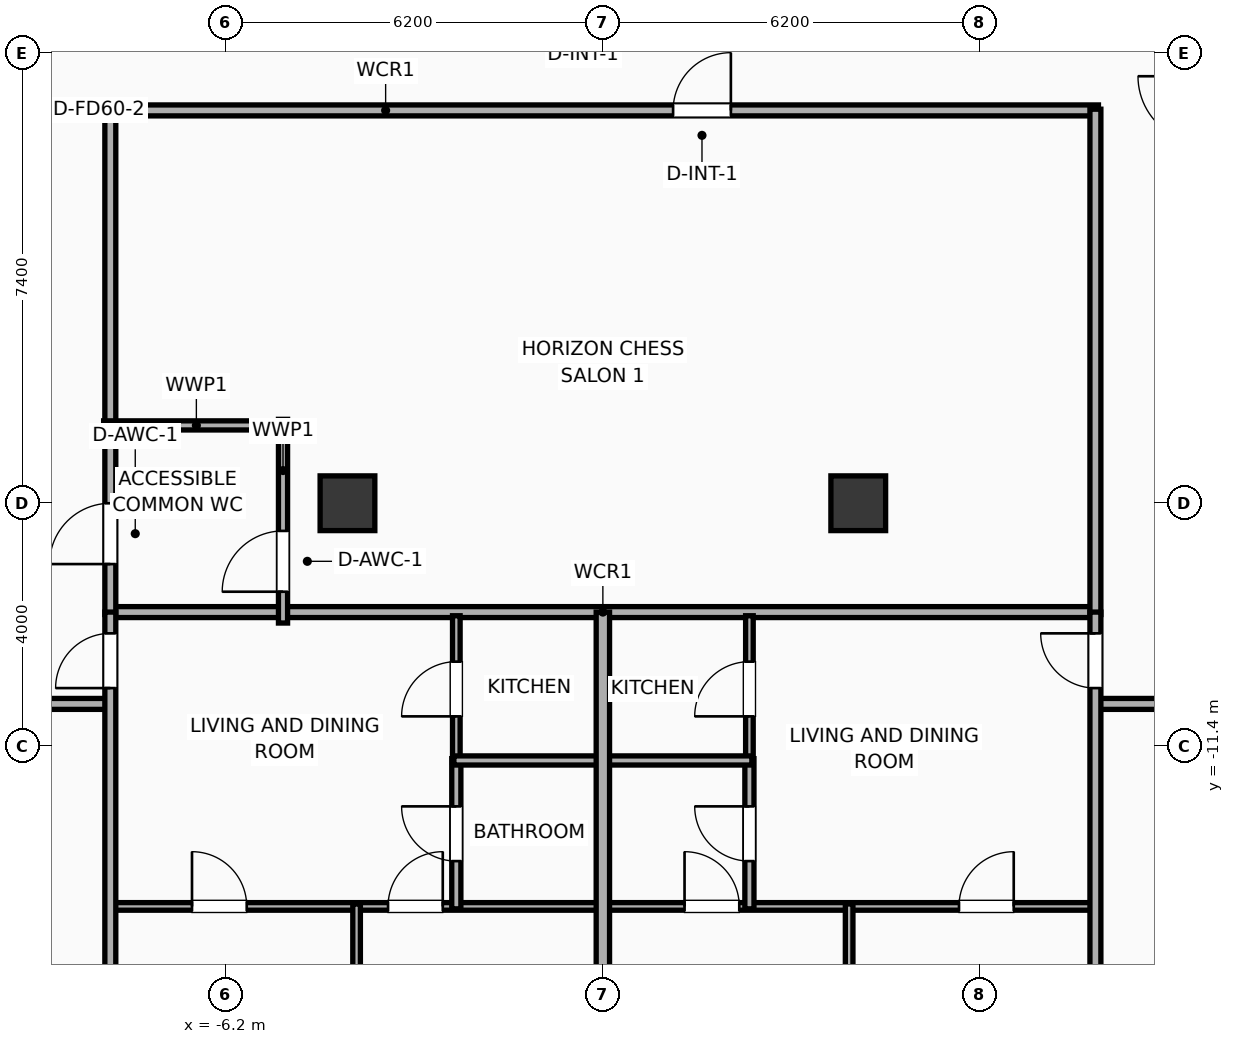
"""IFC4 building model, lengths in metres.
Left out: names, types, materials, properties, quantities, classifications, styles, units other than length and angle.
Written with IfcOpenShell. Run it as: python <this file> out.ifc"""

import sys

from ifc_helpers import new_model, si_unit, direction, frame, frame_2d, origin, origin_2d, place, context, subcontext, project, spatial, rectangle, extrude, element, fill, save


model = new_model("IFC4")
c1 = context("Model", 3, precision=1e-05, world=origin(), true_north=direction((0.0, 1.0)))
c2 = subcontext(c1, "Body", "Model", "MODEL_VIEW")
j1 = project(units=[si_unit("LENGTHUNIT", "METRE"), si_unit("PLANEANGLEUNIT", "RADIAN")], contexts=[c1])
p1 = place(None, origin())
s1 = spatial("IfcSite", under=j1, at=p1, CompositionType="ELEMENT")
p2 = place(p1, origin())
s2 = spatial("IfcBuilding", under=s1, at=p2, CompositionType="ELEMENT")
p3 = place(p2, frame((0.0, 0.0, 148.2)))
s3 = spatial("IfcBuildingStorey", under=s2, at=p3, CompositionType="ELEMENT", Elevation=148.2)
for number, where, z_axis, x_axis in (
    (1, (-4.2, -7.4, 0.0), (0.0, 0.0, 1.0), (1.0, 0.0, 0.0)),
    (2, (4.2, -7.4, 0.0), (0.0, 0.0, 1.0), (1.0, 0.0, 0.0)),
):
    element("IfcColumn", number, at=place(p3, frame(where, z_axis=z_axis, x_axis=x_axis)), inside=s3, PredefinedType="COLUMN", context=c2, shape_type="SweptSolid", body=[
        extrude(rectangle(XDim=0.9, YDim=0.9, at=origin_2d()), origin(), (0.0, 0.0, 1.0), 3.9),
    ])
p4 = place(p3, frame((-8.15, -9.19, 0.0), z_axis=(0.0, 0.0, 1.0), x_axis=(1.0, 0.0, 0.0)))
e3 = element("IfcWall", 3, at=p4, inside=s3, PredefinedType="PARTITIONING", context=c2, shape_type="SweptSolid", body=[
    extrude(rectangle(XDim=16.3, YDim=0.18, at=frame_2d((8.15, 0.0))), origin(), (0.0, 0.0, 1.0), 3.65),
])
p5 = place(p3, frame((-8.15, -0.94, 0.0), z_axis=(0.0, 0.0, 1.0), x_axis=(1.0, 0.0, 0.0)))
e4 = element("IfcWall", 4, at=p5, inside=s3, PredefinedType="PARTITIONING", context=c2, shape_type="SweptSolid", body=[
    extrude(rectangle(XDim=16.3, YDim=0.18, at=frame_2d((8.15, 0.0))), origin(), (0.0, 0.0, 1.0), 3.65),
])
p6 = place(p5, frame((9.305, 0.0, 0.0)))
e5 = element("IfcOpeningElement", 5, at=p6, cuts=e4, PredefinedType="OPENING", context=c2, shape_type="SweptSolid", body=[
    extrude(rectangle(XDim=0.95, YDim=2.05, at=frame_2d((0.475, 1.025))), frame((0.0, 0.1, 0.0), z_axis=(0.0, -1.0, 0.0), x_axis=(1.0, 0.0, 0.0)), (0.0, 0.0, 1.0), 0.2),
])
p7 = place(p3, frame((-8.1, -9.23, 0.0), z_axis=(0.0, 0.0, 1.0), x_axis=(0.0, 1.0, 0.0)))
e6 = element("IfcWall", 6, at=p7, inside=s3, PredefinedType="PARTITIONING", context=c2, shape_type="SweptSolid", body=[
    extrude(rectangle(XDim=8.31, YDim=0.18, at=frame_2d((4.155, 0.0))), origin(), (0.0, 0.0, 1.0), 3.65),
])
p8 = place(p7, frame((0.83, 0.0, 0.0)))
e7 = element("IfcOpeningElement", 7, at=p8, cuts=e6, PredefinedType="OPENING", context=c2, shape_type="SweptSolid", body=[
    extrude(rectangle(XDim=1.0, YDim=2.05, at=frame_2d((0.5, 1.025))), frame((0.0, 0.1, 0.0), z_axis=(0.0, -1.0, 0.0), x_axis=(1.0, 0.0, 0.0)), (0.0, 0.0, 1.0), 0.2),
])
p9 = place(p3, frame((8.1, -9.23, 0.0), z_axis=(0.0, 0.0, 1.0), x_axis=(0.0, 1.0, 0.0)))
e8 = element("IfcWall", 8, at=p9, inside=s3, PredefinedType="PARTITIONING", context=c2, shape_type="SweptSolid", body=[
    extrude(rectangle(XDim=8.31, YDim=0.18, at=frame_2d((4.155, 0.0))), origin(), (0.0, 0.0, 1.0), 3.65),
])
p10 = place(p3, frame((-5.26, -9.37, 0.0), z_axis=(0.0, 0.0, 1.0), x_axis=(0.0, 1.0, 0.0)))
e9 = element("IfcWall", 9, at=p10, inside=s3, PredefinedType="PLUMBINGWALL", context=c2, shape_type="SweptSolid", body=[
    extrude(rectangle(XDim=3.35, YDim=0.15, at=frame_2d((1.675, 0.0))), origin(), (0.0, 0.0, 1.0), 3.65),
])
p11 = place(p10, frame((0.515, 0.0, 0.0)))
e10 = element("IfcOpeningElement", 10, at=p11, cuts=e9, PredefinedType="OPENING", context=c2, shape_type="SweptSolid", body=[
    extrude(rectangle(XDim=1.0, YDim=2.05, at=frame_2d((0.5, 1.025))), frame((0.0, 0.085, 0.0), z_axis=(0.0, -1.0, 0.0), x_axis=(1.0, 0.0, 0.0)), (0.0, 0.0, 1.0), 0.17),
])
p12 = place(p3, frame((-8.21, -6.12, 0.0), z_axis=(0.0, 0.0, 1.0), x_axis=(1.0, 0.0, 0.0)))
e11 = element("IfcWall", 11, at=p12, inside=s3, PredefinedType="PLUMBINGWALL", context=c2, shape_type="SweptSolid", body=[
    extrude(rectangle(XDim=3.05, YDim=0.15, at=frame_2d((1.525, 0.0))), origin(), (0.0, 0.0, 1.0), 3.65),
])
p13 = place(p3, frame((-19.5, -10.7, 0.0), z_axis=(0.0, 0.0, 1.0), x_axis=(1.0, 0.0, 0.0)))
e12 = element("IfcWall", 12, at=p13, inside=s3, PredefinedType="PARTITIONING", context=c2, shape_type="SweptSolid", body=[
    extrude(rectangle(XDim=11.42, YDim=0.18, at=frame_2d((5.71, 0.0))), origin(), (0.0, 0.0, 1.0), 3.65),
])
p14 = place(p13, frame((2.623, 0.0, 0.0)))
e13 = element("IfcOpeningElement", 13, at=p14, cuts=e12, PredefinedType="OPENING", context=c2, shape_type="SweptSolid", body=[
    extrude(rectangle(XDim=0.9, YDim=2.05, at=frame_2d((0.45, 1.025))), frame((0.0, 0.1, 0.0), z_axis=(0.0, -1.0, 0.0), x_axis=(1.0, 0.0, 0.0)), (0.0, 0.0, 1.0), 0.2),
])
p15 = place(p13, frame((9.189, 0.0, 0.0)))
e14 = element("IfcOpeningElement", 14, at=p15, cuts=e12, PredefinedType="OPENING", context=c2, shape_type="SweptSolid", body=[
    extrude(rectangle(XDim=1.15, YDim=2.05, at=frame_2d((0.575, 1.025))), frame((0.0, 0.1, 0.0), z_axis=(0.0, -1.0, 0.0), x_axis=(1.0, 0.0, 0.0)), (0.0, 0.0, 1.0), 0.2),
])
p16 = place(p3, frame((8.08, -10.7, 0.0), z_axis=(0.0, 0.0, 1.0), x_axis=(1.0, 0.0, 0.0)))
e15 = element("IfcWall", 15, at=p16, inside=s3, PredefinedType="PARTITIONING", context=c2, shape_type="SweptSolid", body=[
    extrude(rectangle(XDim=11.42, YDim=0.18, at=frame_2d((5.71, 0.0))), origin(), (0.0, 0.0, 1.0), 3.65),
])
p17 = place(p16, frame((1.175, 0.0, 0.0)))
e16 = element("IfcOpeningElement", 16, at=p17, cuts=e15, PredefinedType="OPENING", context=c2, shape_type="SweptSolid", body=[
    extrude(rectangle(XDim=1.15, YDim=2.05, at=frame_2d((0.575, 1.025))), frame((0.0, 0.1, 0.0), z_axis=(0.0, -1.0, 0.0), x_axis=(1.0, 0.0, 0.0)), (0.0, 0.0, 1.0), 0.2),
])
p18 = place(p16, frame((6.87, 0.0, 0.0)))
e17 = element("IfcOpeningElement", 17, at=p18, cuts=e15, PredefinedType="OPENING", context=c2, shape_type="SweptSolid", body=[
    extrude(rectangle(XDim=1.15, YDim=2.05, at=frame_2d((0.575, 1.025))), frame((0.0, 0.1, 0.0), z_axis=(0.0, -1.0, 0.0), x_axis=(1.0, 0.0, 0.0)), (0.0, 0.0, 1.0), 0.2),
])
p19 = place(p3, frame((-8.08, -14.03, 0.0), z_axis=(0.0, 0.0, 1.0), x_axis=(1.0, 0.0, 0.0)))
e18 = element("IfcWall", 18, at=p19, inside=s3, PredefinedType="PARTITIONING", context=c2, shape_type="SweptSolid", body=[
    extrude(rectangle(XDim=8.06, YDim=0.125, at=frame_2d((4.03, 0.0))), origin(), (0.0, 0.0, 1.0), 3.65),
])
p20 = place(p19, frame((1.323, 0.0, 0.0)))
e19 = element("IfcOpeningElement", 19, at=p20, cuts=e18, PredefinedType="OPENING", context=c2, shape_type="SweptSolid", body=[
    extrude(rectangle(XDim=0.9, YDim=2.05, at=frame_2d((0.45, 1.025))), frame((0.0, 0.073, 0.0), z_axis=(0.0, -1.0, 0.0), x_axis=(1.0, 0.0, 0.0)), (0.0, 0.0, 1.0), 0.145),
])
p21 = place(p19, frame((4.547, 0.0, 0.0)))
e20 = element("IfcOpeningElement", 20, at=p21, cuts=e18, PredefinedType="OPENING", context=c2, shape_type="SweptSolid", body=[
    extrude(rectangle(XDim=0.9, YDim=2.05, at=frame_2d((0.45, 1.025))), frame((0.0, 0.073, 0.0), z_axis=(0.0, -1.0, 0.0), x_axis=(1.0, 0.0, 0.0)), (0.0, 0.0, 1.0), 0.145),
])
p22 = place(p3, frame((-2.41, -11.66, 0.0), z_axis=(0.0, 0.0, 1.0), x_axis=(0.0, 1.0, 0.0)))
e21 = element("IfcWall", 21, at=p22, inside=s3, PredefinedType="PARTITIONING", context=c2, shape_type="SweptSolid", body=[
    extrude(rectangle(XDim=2.41, YDim=0.125, at=frame_2d((1.205, 0.0))), origin(), (0.0, 0.0, 1.0), 3.65),
])
p23 = place(p22, frame((0.755, 0.0, 0.0)))
e22 = element("IfcOpeningElement", 22, at=p23, cuts=e21, PredefinedType="OPENING", context=c2, shape_type="SweptSolid", body=[
    extrude(rectangle(XDim=0.9, YDim=2.05, at=frame_2d((0.45, 1.025))), frame((0.0, 0.073, 0.0), z_axis=(0.0, -1.0, 0.0), x_axis=(1.0, 0.0, 0.0)), (0.0, 0.0, 1.0), 0.145),
])
p24 = place(p3, frame((-2.41, -14.07, 0.0), z_axis=(0.0, 0.0, 1.0), x_axis=(0.0, 1.0, 0.0)))
e23 = element("IfcWall", 23, at=p24, inside=s3, PredefinedType="PLUMBINGWALL", context=c2, shape_type="SweptSolid", body=[
    extrude(rectangle(XDim=2.47, YDim=0.15, at=frame_2d((1.235, 0.0))), origin(), (0.0, 0.0, 1.0), 3.65),
])
p25 = place(p24, frame((0.785, 0.0, 0.0)))
e24 = element("IfcOpeningElement", 24, at=p25, cuts=e23, PredefinedType="OPENING", context=c2, shape_type="SweptSolid", body=[
    extrude(rectangle(XDim=0.9, YDim=2.05, at=frame_2d((0.45, 1.025))), frame((0.0, 0.085, 0.0), z_axis=(0.0, -1.0, 0.0), x_axis=(1.0, 0.0, 0.0)), (0.0, 0.0, 1.0), 0.17),
])
p26 = place(p3, frame((-2.45, -11.63, 0.0), z_axis=(0.0, 0.0, 1.0), x_axis=(1.0, 0.0, 0.0)))
e25 = element("IfcWall", 25, at=p26, inside=s3, PredefinedType="PLUMBINGWALL", context=c2, shape_type="SweptSolid", body=[
    extrude(rectangle(XDim=2.43, YDim=0.15, at=frame_2d((1.215, 0.0))), origin(), (0.0, 0.0, 1.0), 3.65),
])
p27 = place(p3, frame((-4.05, -21.031, 0.0), z_axis=(0.0, 0.0, 1.0), x_axis=(0.0, 1.0, 0.0)))
e26 = element("IfcWall", 26, at=p27, inside=s3, PredefinedType="PARTITIONING", context=c2, shape_type="SweptSolid", body=[
    extrude(rectangle(XDim=7.041, YDim=0.125, at=frame_2d((3.521, 0.0))), origin(), (0.0, 0.0, 1.0), 3.65),
])
p28 = place(p3, frame((-8.1, -21.456, 0.0), z_axis=(0.0, 0.0, 1.0), x_axis=(0.0, 1.0, 0.0)))
e27 = element("IfcWall", 27, at=p28, inside=s3, PredefinedType="PARTITIONING", context=c2, shape_type="SweptSolid", body=[
    extrude(rectangle(XDim=12.266, YDim=0.18, at=frame_2d((6.133, 0.0))), origin(), (0.0, 0.0, 1.0), 3.65),
])
p29 = place(p28, frame((11.017, 0.0, 0.0)))
e28 = element("IfcOpeningElement", 28, at=p29, cuts=e27, PredefinedType="OPENING", context=c2, shape_type="SweptSolid", body=[
    extrude(rectangle(XDim=0.9, YDim=2.05, at=frame_2d((0.45, 1.025))), frame((0.0, 0.1, 0.0), z_axis=(0.0, -1.0, 0.0), x_axis=(1.0, 0.0, 0.0)), (0.0, 0.0, 1.0), 0.2),
])
p30 = place(p3, frame((0.02, -14.03, 0.0), z_axis=(0.0, 0.0, 1.0), x_axis=(1.0, 0.0, 0.0)))
e29 = element("IfcWall", 29, at=p30, inside=s3, PredefinedType="PARTITIONING", context=c2, shape_type="SweptSolid", body=[
    extrude(rectangle(XDim=8.06, YDim=0.125, at=frame_2d((4.03, 0.0))), origin(), (0.0, 0.0, 1.0), 3.65),
])
p31 = place(p30, frame((1.323, 0.0, 0.0)))
e30 = element("IfcOpeningElement", 30, at=p31, cuts=e29, PredefinedType="OPENING", context=c2, shape_type="SweptSolid", body=[
    extrude(rectangle(XDim=0.9, YDim=2.05, at=frame_2d((0.45, 1.025))), frame((0.0, 0.073, 0.0), z_axis=(0.0, -1.0, 0.0), x_axis=(1.0, 0.0, 0.0)), (0.0, 0.0, 1.0), 0.145),
])
p32 = place(p30, frame((5.837, 0.0, 0.0)))
e31 = element("IfcOpeningElement", 31, at=p32, cuts=e29, PredefinedType="OPENING", context=c2, shape_type="SweptSolid", body=[
    extrude(rectangle(XDim=0.9, YDim=2.05, at=frame_2d((0.45, 1.025))), frame((0.0, 0.073, 0.0), z_axis=(0.0, -1.0, 0.0), x_axis=(1.0, 0.0, 0.0)), (0.0, 0.0, 1.0), 0.145),
])
p33 = place(p3, frame((2.41, -11.66, 0.0), z_axis=(0.0, 0.0, 1.0), x_axis=(0.0, 1.0, 0.0)))
e32 = element("IfcWall", 32, at=p33, inside=s3, PredefinedType="PARTITIONING", context=c2, shape_type="SweptSolid", body=[
    extrude(rectangle(XDim=2.41, YDim=0.125, at=frame_2d((1.205, 0.0))), origin(), (0.0, 0.0, 1.0), 3.65),
])
p34 = place(p33, frame((0.755, 0.0, 0.0)))
e33 = element("IfcOpeningElement", 33, at=p34, cuts=e32, PredefinedType="OPENING", context=c2, shape_type="SweptSolid", body=[
    extrude(rectangle(XDim=0.9, YDim=2.05, at=frame_2d((0.45, 1.025))), frame((0.0, 0.073, 0.0), z_axis=(0.0, -1.0, 0.0), x_axis=(1.0, 0.0, 0.0)), (0.0, 0.0, 1.0), 0.145),
])
p35 = place(p3, frame((2.41, -14.07, 0.0), z_axis=(0.0, 0.0, 1.0), x_axis=(0.0, 1.0, 0.0)))
e34 = element("IfcWall", 34, at=p35, inside=s3, PredefinedType="PLUMBINGWALL", context=c2, shape_type="SweptSolid", body=[
    extrude(rectangle(XDim=2.47, YDim=0.15, at=frame_2d((1.235, 0.0))), origin(), (0.0, 0.0, 1.0), 3.65),
])
p36 = place(p35, frame((0.785, 0.0, 0.0)))
e35 = element("IfcOpeningElement", 35, at=p36, cuts=e34, PredefinedType="OPENING", context=c2, shape_type="SweptSolid", body=[
    extrude(rectangle(XDim=0.9, YDim=2.05, at=frame_2d((0.45, 1.025))), frame((0.0, 0.085, 0.0), z_axis=(0.0, -1.0, 0.0), x_axis=(1.0, 0.0, 0.0)), (0.0, 0.0, 1.0), 0.17),
])
p37 = place(p3, frame((0.02, -11.63, 0.0), z_axis=(0.0, 0.0, 1.0), x_axis=(1.0, 0.0, 0.0)))
e36 = element("IfcWall", 36, at=p37, inside=s3, PredefinedType="PLUMBINGWALL", context=c2, shape_type="SweptSolid", body=[
    extrude(rectangle(XDim=2.43, YDim=0.15, at=frame_2d((1.215, 0.0))), origin(), (0.0, 0.0, 1.0), 3.65),
])
p38 = place(p3, frame((4.05, -20.179, 0.0), z_axis=(0.0, 0.0, 1.0), x_axis=(0.0, 1.0, 0.0)))
e37 = element("IfcWall", 37, at=p38, inside=s3, PredefinedType="PARTITIONING", context=c2, shape_type="SweptSolid", body=[
    extrude(rectangle(XDim=6.189, YDim=0.125, at=frame_2d((3.095, 0.0))), origin(), (0.0, 0.0, 1.0), 3.04),
])
p39 = place(p3, frame((8.1, -19.754, 0.0), z_axis=(0.0, 0.0, 1.0), x_axis=(0.0, 1.0, 0.0)))
e38 = element("IfcWall", 38, at=p39, inside=s3, PredefinedType="PARTITIONING", context=c2, shape_type="SweptSolid", body=[
    extrude(rectangle(XDim=10.564, YDim=0.18, at=frame_2d((5.282, 0.0))), origin(), (0.0, 0.0, 1.0), 3.65),
])
p40 = place(p39, frame((9.314, 0.0, 0.0)))
e39 = element("IfcOpeningElement", 39, at=p40, cuts=e38, PredefinedType="OPENING", context=c2, shape_type="SweptSolid", body=[
    extrude(rectangle(XDim=0.9, YDim=2.05, at=frame_2d((0.45, 1.025))), frame((0.0, 0.1, 0.0), z_axis=(0.0, -1.0, 0.0), x_axis=(1.0, 0.0, 0.0)), (0.0, 0.0, 1.0), 0.2),
])
p41 = place(p3, frame((0.0, -20.605, 0.0), z_axis=(0.0, 0.0, 1.0), x_axis=(0.0, 1.0, 0.0)))
e40 = element("IfcWall", 40, at=p41, inside=s3, PredefinedType="PARTITIONING", context=c2, shape_type="SweptSolid", body=[
    extrude(rectangle(XDim=11.415, YDim=0.22, at=frame_2d((5.708, 0.0))), origin(), (0.0, 0.0, 1.0), 3.65),
])
p42 = place(p6, origin())
e41 = element("IfcDoor", 41, at=p42, inside=s3, OperationType="SINGLE_SWING_RIGHT", PredefinedType="DOOR", context=c2, shape_type="SweptSolid", body=[
    extrude(rectangle(XDim=0.95, YDim=2.05, at=frame_2d((0.475, 1.025))), frame((0.0, 0.025, 0.0), z_axis=(0.0, -1.0, 0.0), x_axis=(1.0, 0.0, 0.0)), (0.0, 0.0, 1.0), 0.05),
])
fill(e5, e41)
p43 = place(p8, origin())
e42 = element("IfcDoor", 42, at=p43, inside=s3, OperationType="SINGLE_SWING_LEFT", PredefinedType="DOOR", context=c2, shape_type="SweptSolid", body=[
    extrude(rectangle(XDim=1.0, YDim=2.05, at=frame_2d((0.5, 1.025))), frame((0.0, 0.025, 0.0), z_axis=(0.0, -1.0, 0.0), x_axis=(1.0, 0.0, 0.0)), (0.0, 0.0, 1.0), 0.05),
])
fill(e7, e42)
p44 = place(p11, origin())
e43 = element("IfcDoor", 43, at=p44, inside=s3, OperationType="SINGLE_SWING_LEFT", PredefinedType="DOOR", context=c2, shape_type="SweptSolid", body=[
    extrude(rectangle(XDim=1.0, YDim=2.05, at=frame_2d((0.5, 1.025))), frame((0.0, 0.025, 0.0), z_axis=(0.0, -1.0, 0.0), x_axis=(1.0, 0.0, 0.0)), (0.0, 0.0, 1.0), 0.05),
])
fill(e10, e43)
p45 = place(p20, origin())
e44 = element("IfcDoor", 44, at=p45, inside=s3, OperationType="SINGLE_SWING_LEFT", PredefinedType="DOOR", context=c2, shape_type="SweptSolid", body=[
    extrude(rectangle(XDim=0.9, YDim=2.05, at=frame_2d((0.45, 1.025))), frame((0.0, 0.025, 0.0), z_axis=(0.0, -1.0, 0.0), x_axis=(1.0, 0.0, 0.0)), (0.0, 0.0, 1.0), 0.05),
])
fill(e19, e44)
p46 = place(p21, origin())
e45 = element("IfcDoor", 45, at=p46, inside=s3, OperationType="SINGLE_SWING_RIGHT", PredefinedType="DOOR", context=c2, shape_type="SweptSolid", body=[
    extrude(rectangle(XDim=0.9, YDim=2.05, at=frame_2d((0.45, 1.025))), frame((0.0, 0.025, 0.0), z_axis=(0.0, -1.0, 0.0), x_axis=(1.0, 0.0, 0.0)), (0.0, 0.0, 1.0), 0.05),
])
fill(e20, e45)
p47 = place(p23, origin())
e46 = element("IfcDoor", 46, at=p47, inside=s3, OperationType="SINGLE_SWING_LEFT", PredefinedType="DOOR", context=c2, shape_type="SweptSolid", body=[
    extrude(rectangle(XDim=0.9, YDim=2.05, at=frame_2d((0.45, 1.025))), frame((0.0, 0.025, 0.0), z_axis=(0.0, -1.0, 0.0), x_axis=(1.0, 0.0, 0.0)), (0.0, 0.0, 1.0), 0.05),
])
fill(e22, e46)
p48 = place(p25, origin())
e47 = element("IfcDoor", 47, at=p48, inside=s3, OperationType="SINGLE_SWING_RIGHT", PredefinedType="DOOR", context=c2, shape_type="SweptSolid", body=[
    extrude(rectangle(XDim=0.9, YDim=2.05, at=frame_2d((0.45, 1.025))), frame((0.0, 0.025, 0.0), z_axis=(0.0, -1.0, 0.0), x_axis=(1.0, 0.0, 0.0)), (0.0, 0.0, 1.0), 0.05),
])
fill(e24, e47)
p49 = place(p29, origin())
e48 = element("IfcDoor", 48, at=p49, inside=s3, OperationType="SINGLE_SWING_LEFT", PredefinedType="DOOR", context=c2, shape_type="SweptSolid", body=[
    extrude(rectangle(XDim=0.9, YDim=2.05, at=frame_2d((0.45, 1.025))), frame((0.0, 0.025, 0.0), z_axis=(0.0, -1.0, 0.0), x_axis=(1.0, 0.0, 0.0)), (0.0, 0.0, 1.0), 0.05),
])
fill(e28, e48)
p50 = place(p31, origin())
e49 = element("IfcDoor", 49, at=p50, inside=s3, OperationType="SINGLE_SWING_LEFT", PredefinedType="DOOR", context=c2, shape_type="SweptSolid", body=[
    extrude(rectangle(XDim=0.9, YDim=2.05, at=frame_2d((0.45, 1.025))), frame((0.0, 0.025, 0.0), z_axis=(0.0, -1.0, 0.0), x_axis=(1.0, 0.0, 0.0)), (0.0, 0.0, 1.0), 0.05),
])
fill(e30, e49)
p51 = place(p32, origin())
e50 = element("IfcDoor", 50, at=p51, inside=s3, OperationType="SINGLE_SWING_RIGHT", PredefinedType="DOOR", context=c2, shape_type="SweptSolid", body=[
    extrude(rectangle(XDim=0.9, YDim=2.05, at=frame_2d((0.45, 1.025))), frame((0.0, 0.025, 0.0), z_axis=(0.0, -1.0, 0.0), x_axis=(1.0, 0.0, 0.0)), (0.0, 0.0, 1.0), 0.05),
])
fill(e31, e50)
p52 = place(p34, origin())
e51 = element("IfcDoor", 51, at=p52, inside=s3, OperationType="SINGLE_SWING_LEFT", PredefinedType="DOOR", context=c2, shape_type="SweptSolid", body=[
    extrude(rectangle(XDim=0.9, YDim=2.05, at=frame_2d((0.45, 1.025))), frame((0.0, 0.025, 0.0), z_axis=(0.0, -1.0, 0.0), x_axis=(1.0, 0.0, 0.0)), (0.0, 0.0, 1.0), 0.05),
])
fill(e33, e51)
p53 = place(p36, origin())
e52 = element("IfcDoor", 52, at=p53, inside=s3, OperationType="SINGLE_SWING_RIGHT", PredefinedType="DOOR", context=c2, shape_type="SweptSolid", body=[
    extrude(rectangle(XDim=0.9, YDim=2.05, at=frame_2d((0.45, 1.025))), frame((0.0, 0.025, 0.0), z_axis=(0.0, -1.0, 0.0), x_axis=(1.0, 0.0, 0.0)), (0.0, 0.0, 1.0), 0.05),
])
fill(e35, e52)
p54 = place(p40, origin())
e53 = element("IfcDoor", 53, at=p54, inside=s3, OperationType="SINGLE_SWING_RIGHT", PredefinedType="DOOR", context=c2, shape_type="SweptSolid", body=[
    extrude(rectangle(XDim=0.9, YDim=2.05, at=frame_2d((0.45, 1.025))), frame((0.0, 0.025, 0.0), z_axis=(0.0, -1.0, 0.0), x_axis=(1.0, 0.0, 0.0)), (0.0, 0.0, 1.0), 0.05),
])
fill(e39, e53)
save(model, sys.argv[1])
